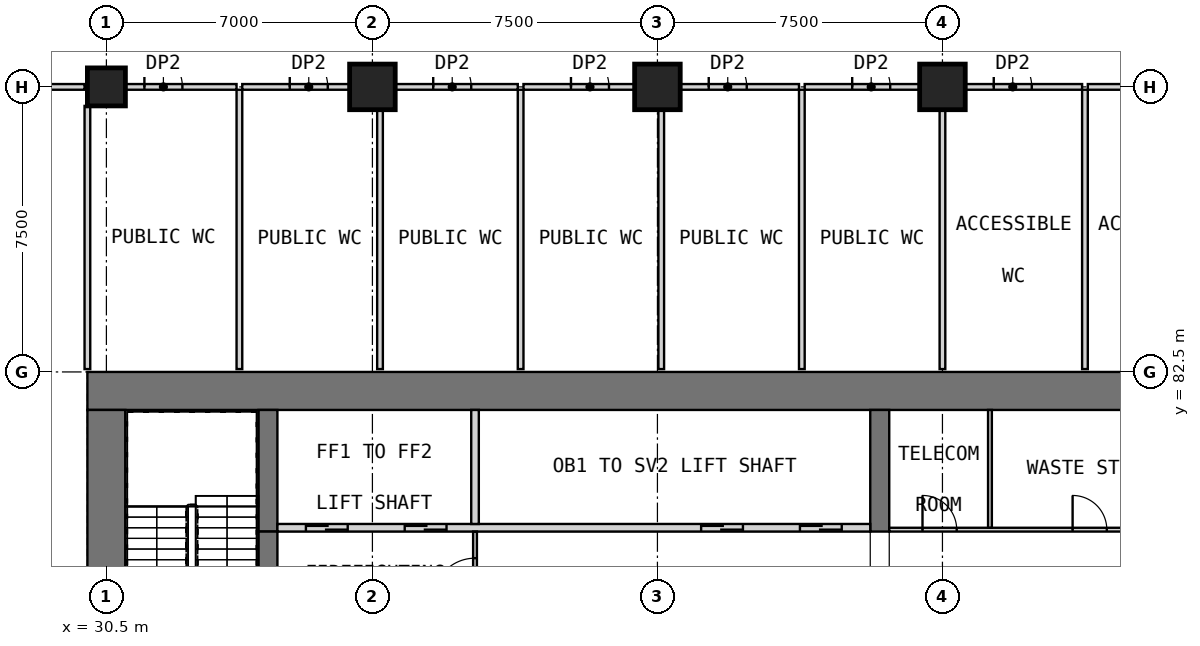
"""IFC4 building model, lengths in metres.
Left out: names, types, materials, properties, quantities, classifications, styles, units other than length and angle.
Written with IfcOpenShell. Run it as: python <this file> out.ifc"""

import sys

from ifc_helpers import new_model, si_unit, direction, frame, frame_2d, origin, origin_2d, place, context, subcontext, project, spatial, rectangle, extrude, element, fill, save


model = new_model("IFC4")
c1 = context("Model", 3, precision=1e-05, world=origin(), true_north=direction((0.0, 1.0)))
c2 = subcontext(c1, "Body", "Model", "MODEL_VIEW")
j1 = project(units=[si_unit("LENGTHUNIT", "METRE"), si_unit("PLANEANGLEUNIT", "RADIAN")], contexts=[c1])
p1 = place(None, origin())
s1 = spatial("IfcSite", under=j1, at=p1, CompositionType="ELEMENT")
p2 = place(p1, origin())
s2 = spatial("IfcBuilding", under=s1, at=p2, CompositionType="ELEMENT")
p3 = place(p2, frame((0.0, 0.0, 29.0)))
s3 = spatial("IfcBuildingStorey", under=s2, at=p3, CompositionType="ELEMENT", Elevation=29.0)
p4 = place(p3, frame((30.5, 90.0, 0.0), z_axis=(0.0, 0.0, 1.0), x_axis=(1.0, 0.0, 0.0)))
e1 = element("IfcColumn", 1, at=p4, inside=s3, PredefinedType="COLUMN", context=c2, shape_type="SweptSolid", body=[
    extrude(rectangle(XDim=1.0, YDim=1.0, at=origin_2d()), origin(), (0.0, 0.0, 1.0), 5.0),
])
for number, where, z_axis, x_axis in (
    (2, (37.5, 90.0, 0.0), (0.0, 0.0, 1.0), (1.0, 0.0, 0.0)),
    (3, (45.0, 90.0, 0.0), (0.0, 0.0, 1.0), (1.0, 0.0, 0.0)),
    (4, (52.5, 90.0, 0.0), (0.0, 0.0, 1.0), (1.0, 0.0, 0.0)),
):
    element("IfcColumn", number, at=place(p3, frame(where, z_axis=z_axis, x_axis=x_axis)), inside=s3, PredefinedType="COLUMN", context=c2, shape_type="SweptSolid", body=[
        extrude(rectangle(XDim=1.2, YDim=1.2, at=origin_2d()), origin(), (0.0, 0.0, 1.0), 5.0),
    ])
p5 = place(p3, frame((30.0, 82.0, 0.0), z_axis=(0.0, 0.0, 1.0), x_axis=(1.0, 0.0, 0.0)))
e5 = element("IfcWall", 5, at=p5, inside=s3, PredefinedType="SHEAR", context=c2, shape_type="SweptSolid", body=[
    extrude(rectangle(XDim=30.0, YDim=1.0, at=frame_2d((15.0, 0.0))), origin(), (0.0, 0.0, 1.0), 5.0),
])
p6 = place(p3, frame((30.5, 61.0, 0.0), z_axis=(0.0, 0.0, 1.0), x_axis=(0.0, 1.0, 0.0)))
e6 = element("IfcWall", 6, at=p6, inside=s3, PredefinedType="SHEAR", context=c2, shape_type="SweptSolid", body=[
    extrude(rectangle(XDim=20.5, YDim=1.0, at=frame_2d((10.25, 0.0))), origin(), (0.0, 0.0, 1.0), 5.0),
])
for number, where, z_axis, x_axis in (
    (7, (34.75, 78.3, 0.0), (0.0, 0.0, 1.0), (0.0, 1.0, 0.0)),
    (8, (50.85, 78.3, 0.0), (0.0, 0.0, 1.0), (0.0, 1.0, 0.0)),
):
    element("IfcWall", number, at=place(p3, frame(where, z_axis=z_axis, x_axis=x_axis)), inside=s3, PredefinedType="SHEAR", context=c2, shape_type="SweptSolid", body=[
        extrude(rectangle(XDim=3.2, YDim=0.5, at=frame_2d((1.6, 0.0))), origin(), (0.0, 0.0, 1.0), 5.0),
    ])
p7 = place(p3, frame((35.0, 78.4, 0.0), z_axis=(0.0, 0.0, 1.0), x_axis=(1.0, 0.0, 0.0)))
e9 = element("IfcWall", 9, at=p7, inside=s3, PredefinedType="SOLIDWALL", context=c2, shape_type="SweptSolid", body=[
    extrude(rectangle(XDim=15.6, YDim=0.2, at=frame_2d((7.8, 0.0))), origin(), (0.0, 0.0, 1.0), 5.0),
])
p8 = place(p7, frame((0.75, 0.0, 0.0)))
e10 = element("IfcOpeningElement", 10, at=p8, cuts=e9, PredefinedType="OPENING", context=c2, shape_type="SweptSolid", body=[
    extrude(rectangle(XDim=1.1, YDim=2.1, at=frame_2d((0.55, 1.05))), frame((0.0, 0.11, 0.0), z_axis=(0.0, -1.0, 0.0), x_axis=(1.0, 0.0, 0.0)), (0.0, 0.0, 1.0), 0.22),
])
p9 = place(p7, frame((3.35, 0.0, 0.0)))
e11 = element("IfcOpeningElement", 11, at=p9, cuts=e9, PredefinedType="OPENING", context=c2, shape_type="SweptSolid", body=[
    extrude(rectangle(XDim=1.1, YDim=2.1, at=frame_2d((0.55, 1.05))), frame((0.0, 0.11, 0.0), z_axis=(0.0, -1.0, 0.0), x_axis=(1.0, 0.0, 0.0)), (0.0, 0.0, 1.0), 0.22),
])
p10 = place(p7, frame((11.15, 0.0, 0.0)))
e12 = element("IfcOpeningElement", 12, at=p10, cuts=e9, PredefinedType="OPENING", context=c2, shape_type="SweptSolid", body=[
    extrude(rectangle(XDim=1.1, YDim=2.1, at=frame_2d((0.55, 1.05))), frame((0.0, 0.11, 0.0), z_axis=(0.0, -1.0, 0.0), x_axis=(1.0, 0.0, 0.0)), (0.0, 0.0, 1.0), 0.22),
])
p11 = place(p7, frame((13.75, 0.0, 0.0)))
e13 = element("IfcOpeningElement", 13, at=p11, cuts=e9, PredefinedType="OPENING", context=c2, shape_type="SweptSolid", body=[
    extrude(rectangle(XDim=1.1, YDim=2.1, at=frame_2d((0.55, 1.05))), frame((0.0, 0.11, 0.0), z_axis=(0.0, -1.0, 0.0), x_axis=(1.0, 0.0, 0.0)), (0.0, 0.0, 1.0), 0.22),
])
p12 = place(p3, frame((40.2, 78.5, 0.0), z_axis=(0.0, 0.0, 1.0), x_axis=(0.0, 1.0, 0.0)))
e14 = element("IfcWall", 14, at=p12, inside=s3, PredefinedType="SOLIDWALL", context=c2, shape_type="SweptSolid", body=[
    extrude(rectangle(XDim=3.0, YDim=0.2, at=frame_2d((1.5, 0.0))), origin(), (0.0, 0.0, 1.0), 5.0),
])
p13 = place(p3, frame((40.2, 75.3, 0.0), z_axis=(0.0, 0.0, 1.0), x_axis=(0.0, 1.0, 0.0)))
e15 = element("IfcWall", 15, at=p13, inside=s3, PredefinedType="PARTITIONING", context=c2, shape_type="SweptSolid", body=[
    extrude(rectangle(XDim=3.0, YDim=0.1, at=frame_2d((1.5, 0.0))), origin(), (0.0, 0.0, 1.0), 4.75),
])
p14 = place(p13, frame((1.2, 0.0, 0.0)))
e16 = element("IfcOpeningElement", 16, at=p14, cuts=e15, PredefinedType="OPENING", context=c2, shape_type="SweptSolid", body=[
    extrude(rectangle(XDim=1.1, YDim=2.1, at=frame_2d((0.55, 1.05))), frame((0.0, 0.06, 0.0), z_axis=(0.0, -1.0, 0.0), x_axis=(1.0, 0.0, 0.0)), (0.0, 0.0, 1.0), 0.12),
])
p15 = place(p3, frame((34.75, 74.45, 0.0), z_axis=(0.0, 0.0, 1.0), x_axis=(0.0, 1.0, 0.0)))
e17 = element("IfcWall", 17, at=p15, inside=s3, PredefinedType="SOLIDWALL", context=c2, shape_type="SweptSolid", body=[
    extrude(rectangle(XDim=3.85, YDim=0.5, at=frame_2d((1.925, 0.0))), origin(), (0.0, 0.0, 1.0), 3.8),
])
p16 = place(p15, frame((1.0, 0.0, 0.0)))
e18 = element("IfcOpeningElement", 18, at=p16, cuts=e17, PredefinedType="OPENING", context=c2, shape_type="SweptSolid", body=[
    extrude(rectangle(XDim=1.2, YDim=2.1, at=frame_2d((0.6, 1.05))), frame((0.0, 0.26, 0.0), z_axis=(0.0, -1.0, 0.0), x_axis=(1.0, 0.0, 0.0)), (0.0, 0.0, 1.0), 0.52),
])
p17 = place(p3, frame((51.1, 78.35, 0.0), z_axis=(0.0, 0.0, 1.0), x_axis=(1.0, 0.0, 0.0)))
e19 = element("IfcWall", 19, at=p17, inside=s3, PredefinedType="PARTITIONING", context=c2, shape_type="SweptSolid", body=[
    extrude(rectangle(XDim=7.9, YDim=0.1, at=frame_2d((3.95, 0.0))), origin(), (0.0, 0.0, 1.0), 4.75),
])
p18 = place(p17, frame((0.875, 0.0, 0.0)))
e20 = element("IfcOpeningElement", 20, at=p18, cuts=e19, PredefinedType="OPENING", context=c2, shape_type="SweptSolid", body=[
    extrude(rectangle(XDim=0.9, YDim=2.1, at=frame_2d((0.45, 1.05))), frame((0.0, 0.06, 0.0), z_axis=(0.0, -1.0, 0.0), x_axis=(1.0, 0.0, 0.0)), (0.0, 0.0, 1.0), 0.12),
])
p19 = place(p17, frame((4.825, 0.0, 0.0)))
e21 = element("IfcOpeningElement", 21, at=p19, cuts=e19, PredefinedType="OPENING", context=c2, shape_type="SweptSolid", body=[
    extrude(rectangle(XDim=0.9, YDim=2.1, at=frame_2d((0.45, 1.05))), frame((0.0, 0.06, 0.0), z_axis=(0.0, -1.0, 0.0), x_axis=(1.0, 0.0, 0.0)), (0.0, 0.0, 1.0), 0.12),
])
p20 = place(p3, frame((53.75, 78.4, 0.0), z_axis=(0.0, 0.0, 1.0), x_axis=(0.0, 1.0, 0.0)))
e22 = element("IfcWall", 22, at=p20, inside=s3, PredefinedType="PARTITIONING", context=c2, shape_type="SweptSolid", body=[
    extrude(rectangle(XDim=3.1, YDim=0.1, at=frame_2d((1.55, 0.0))), origin(), (0.0, 0.0, 1.0), 4.75),
])
p21 = place(p3, frame((23.6, 90.0, 0.0), z_axis=(0.0, 0.0, 1.0), x_axis=(1.0, 0.0, 0.0)))
e23 = element("IfcWall", 23, at=p21, inside=s3, PredefinedType="PARTITIONING", context=c2, shape_type="SweptSolid", body=[
    extrude(rectangle(XDim=6.325, YDim=0.15, at=frame_2d((3.163, 0.0))), origin(), (0.0, 0.0, 1.0), 4.7),
])
p22 = place(p3, frame((31.0, 90.0, 0.0), z_axis=(0.0, 0.0, 1.0), x_axis=(1.0, 0.0, 0.0)))
e24 = element("IfcWall", 24, at=p22, inside=s3, PredefinedType="PARTITIONING", context=c2, shape_type="SweptSolid", body=[
    extrude(rectangle(XDim=2.925, YDim=0.15, at=frame_2d((1.462, 0.0))), origin(), (0.0, 0.0, 1.0), 4.7),
])
p23 = place(p22, frame((0.5, 0.0, 0.0)))
e25 = element("IfcOpeningElement", 25, at=p23, cuts=e24, PredefinedType="OPENING", context=c2, shape_type="SweptSolid", body=[
    extrude(rectangle(XDim=1.0, YDim=2.1, at=frame_2d((0.5, 1.05))), frame((0.0, 0.085, 0.0), z_axis=(0.0, -1.0, 0.0), x_axis=(1.0, 0.0, 0.0)), (0.0, 0.0, 1.0), 0.17),
])
p24 = place(p3, frame((34.075, 90.0, 0.0), z_axis=(0.0, 0.0, 1.0), x_axis=(1.0, 0.0, 0.0)))
e26 = element("IfcWall", 26, at=p24, inside=s3, PredefinedType="PARTITIONING", context=c2, shape_type="SweptSolid", body=[
    extrude(rectangle(XDim=2.825, YDim=0.15, at=frame_2d((1.413, 0.0))), origin(), (0.0, 0.0, 1.0), 4.7),
])
p25 = place(p24, frame((1.25, 0.0, 0.0)))
e27 = element("IfcOpeningElement", 27, at=p25, cuts=e26, PredefinedType="OPENING", context=c2, shape_type="SweptSolid", body=[
    extrude(rectangle(XDim=1.0, YDim=2.1, at=frame_2d((0.5, 1.05))), frame((0.0, 0.085, 0.0), z_axis=(0.0, -1.0, 0.0), x_axis=(1.0, 0.0, 0.0)), (0.0, 0.0, 1.0), 0.17),
])
p26 = place(p3, frame((38.1, 90.0, 0.0), z_axis=(0.0, 0.0, 1.0), x_axis=(1.0, 0.0, 0.0)))
e28 = element("IfcWall", 28, at=p26, inside=s3, PredefinedType="PARTITIONING", context=c2, shape_type="SweptSolid", body=[
    extrude(rectangle(XDim=3.225, YDim=0.15, at=frame_2d((1.612, 0.0))), origin(), (0.0, 0.0, 1.0), 4.7),
])
p27 = place(p26, frame((1.0, 0.0, 0.0)))
e29 = element("IfcOpeningElement", 29, at=p27, cuts=e28, PredefinedType="OPENING", context=c2, shape_type="SweptSolid", body=[
    extrude(rectangle(XDim=1.0, YDim=2.1, at=frame_2d((0.5, 1.05))), frame((0.0, 0.085, 0.0), z_axis=(0.0, -1.0, 0.0), x_axis=(1.0, 0.0, 0.0)), (0.0, 0.0, 1.0), 0.17),
])
p28 = place(p3, frame((41.475, 90.0, 0.0), z_axis=(0.0, 0.0, 1.0), x_axis=(1.0, 0.0, 0.0)))
e30 = element("IfcWall", 30, at=p28, inside=s3, PredefinedType="PARTITIONING", context=c2, shape_type="SweptSolid", body=[
    extrude(rectangle(XDim=2.925, YDim=0.15, at=frame_2d((1.462, 0.0))), origin(), (0.0, 0.0, 1.0), 4.7),
])
p29 = place(p28, frame((1.25, 0.0, 0.0)))
e31 = element("IfcOpeningElement", 31, at=p29, cuts=e30, PredefinedType="OPENING", context=c2, shape_type="SweptSolid", body=[
    extrude(rectangle(XDim=1.0, YDim=2.1, at=frame_2d((0.5, 1.05))), frame((0.0, 0.085, 0.0), z_axis=(0.0, -1.0, 0.0), x_axis=(1.0, 0.0, 0.0)), (0.0, 0.0, 1.0), 0.17),
])
p30 = place(p3, frame((45.6, 90.0, 0.0), z_axis=(0.0, 0.0, 1.0), x_axis=(1.0, 0.0, 0.0)))
e32 = element("IfcWall", 32, at=p30, inside=s3, PredefinedType="PARTITIONING", context=c2, shape_type="SweptSolid", body=[
    extrude(rectangle(XDim=3.125, YDim=0.15, at=frame_2d((1.562, 0.0))), origin(), (0.0, 0.0, 1.0), 4.7),
])
p31 = place(p30, frame((0.75, 0.0, 0.0)))
e33 = element("IfcOpeningElement", 33, at=p31, cuts=e32, PredefinedType="OPENING", context=c2, shape_type="SweptSolid", body=[
    extrude(rectangle(XDim=1.0, YDim=2.1, at=frame_2d((0.5, 1.05))), frame((0.0, 0.085, 0.0), z_axis=(0.0, -1.0, 0.0), x_axis=(1.0, 0.0, 0.0)), (0.0, 0.0, 1.0), 0.17),
])
p32 = place(p3, frame((48.875, 90.0, 0.0), z_axis=(0.0, 0.0, 1.0), x_axis=(1.0, 0.0, 0.0)))
e34 = element("IfcWall", 34, at=p32, inside=s3, PredefinedType="PARTITIONING", context=c2, shape_type="SweptSolid", body=[
    extrude(rectangle(XDim=3.025, YDim=0.15, at=frame_2d((1.512, 0.0))), origin(), (0.0, 0.0, 1.0), 4.7),
])
p33 = place(p32, frame((1.25, 0.0, 0.0)))
e35 = element("IfcOpeningElement", 35, at=p33, cuts=e34, PredefinedType="OPENING", context=c2, shape_type="SweptSolid", body=[
    extrude(rectangle(XDim=1.0, YDim=2.1, at=frame_2d((0.5, 1.05))), frame((0.0, 0.085, 0.0), z_axis=(0.0, -1.0, 0.0), x_axis=(1.0, 0.0, 0.0)), (0.0, 0.0, 1.0), 0.17),
])
p34 = place(p3, frame((53.1, 90.0, 0.0), z_axis=(0.0, 0.0, 1.0), x_axis=(1.0, 0.0, 0.0)))
e36 = element("IfcWall", 36, at=p34, inside=s3, PredefinedType="PARTITIONING", context=c2, shape_type="SweptSolid", body=[
    extrude(rectangle(XDim=3.075, YDim=0.15, at=frame_2d((1.538, 0.0))), origin(), (0.0, 0.0, 1.0), 4.7),
])
p35 = place(p34, frame((0.75, 0.0, 0.0)))
e37 = element("IfcOpeningElement", 37, at=p35, cuts=e36, PredefinedType="OPENING", context=c2, shape_type="SweptSolid", body=[
    extrude(rectangle(XDim=1.0, YDim=2.1, at=frame_2d((0.5, 1.05))), frame((0.0, 0.085, 0.0), z_axis=(0.0, -1.0, 0.0), x_axis=(1.0, 0.0, 0.0)), (0.0, 0.0, 1.0), 0.17),
])
p36 = place(p3, frame((56.325, 90.0, 0.0), z_axis=(0.0, 0.0, 1.0), x_axis=(1.0, 0.0, 0.0)))
e38 = element("IfcWall", 38, at=p36, inside=s3, PredefinedType="PARTITIONING", context=c2, shape_type="SweptSolid", body=[
    extrude(rectangle(XDim=3.075, YDim=0.15, at=frame_2d((1.538, 0.0))), origin(), (0.0, 0.0, 1.0), 4.7),
])
p37 = place(p36, frame((1.25, 0.0, 0.0)))
e39 = element("IfcOpeningElement", 39, at=p37, cuts=e38, PredefinedType="OPENING", context=c2, shape_type="SweptSolid", body=[
    extrude(rectangle(XDim=1.0, YDim=2.1, at=frame_2d((0.5, 1.05))), frame((0.0, 0.085, 0.0), z_axis=(0.0, -1.0, 0.0), x_axis=(1.0, 0.0, 0.0)), (0.0, 0.0, 1.0), 0.17),
])
p38 = place(p3, frame((52.5, 82.575, 0.0), z_axis=(0.0, 0.0, 1.0), x_axis=(0.0, 1.0, 0.0)))
e40 = element("IfcWall", 40, at=p38, inside=s3, PredefinedType="PARTITIONING", context=c2, shape_type="SweptSolid", body=[
    extrude(rectangle(XDim=6.825, YDim=0.15, at=frame_2d((3.413, 0.0))), origin(), (0.0, 0.0, 1.0), 4.7),
])
p39 = place(p3, frame((56.25, 82.575, 0.0), z_axis=(0.0, 0.0, 1.0), x_axis=(0.0, 1.0, 0.0)))
e41 = element("IfcWall", 41, at=p39, inside=s3, PredefinedType="PARTITIONING", context=c2, shape_type="SweptSolid", body=[
    extrude(rectangle(XDim=7.35, YDim=0.15, at=frame_2d((3.675, 0.0))), origin(), (0.0, 0.0, 1.0), 4.7),
])
p40 = place(p3, frame((30.0, 82.575, 0.0), z_axis=(0.0, 0.0, 1.0), x_axis=(0.0, 1.0, 0.0)))
e42 = element("IfcWall", 42, at=p40, inside=s3, PredefinedType="PARTITIONING", context=c2, shape_type="SweptSolid", body=[
    extrude(rectangle(XDim=6.925, YDim=0.15, at=frame_2d((3.462, 0.0))), origin(), (0.0, 0.0, 1.0), 4.7),
])
p41 = place(p3, frame((34.0, 82.575, 0.0), z_axis=(0.0, 0.0, 1.0), x_axis=(0.0, 1.0, 0.0)))
e43 = element("IfcWall", 43, at=p41, inside=s3, PredefinedType="PARTITIONING", context=c2, shape_type="SweptSolid", body=[
    extrude(rectangle(XDim=7.35, YDim=0.15, at=frame_2d((3.675, 0.0))), origin(), (0.0, 0.0, 1.0), 4.7),
])
p42 = place(p3, frame((37.7, 82.575, 0.0), z_axis=(0.0, 0.0, 1.0), x_axis=(0.0, 1.0, 0.0)))
e44 = element("IfcWall", 44, at=p42, inside=s3, PredefinedType="PARTITIONING", context=c2, shape_type="SweptSolid", body=[
    extrude(rectangle(XDim=6.825, YDim=0.15, at=frame_2d((3.413, 0.0))), origin(), (0.0, 0.0, 1.0), 4.7),
])
p43 = place(p3, frame((41.4, 82.575, 0.0), z_axis=(0.0, 0.0, 1.0), x_axis=(0.0, 1.0, 0.0)))
e45 = element("IfcWall", 45, at=p43, inside=s3, PredefinedType="PARTITIONING", context=c2, shape_type="SweptSolid", body=[
    extrude(rectangle(XDim=7.35, YDim=0.15, at=frame_2d((3.675, 0.0))), origin(), (0.0, 0.0, 1.0), 4.7),
])
p44 = place(p3, frame((45.1, 82.575, 0.0), z_axis=(0.0, 0.0, 1.0), x_axis=(0.0, 1.0, 0.0)))
e46 = element("IfcWall", 46, at=p44, inside=s3, PredefinedType="PARTITIONING", context=c2, shape_type="SweptSolid", body=[
    extrude(rectangle(XDim=6.825, YDim=0.15, at=frame_2d((3.413, 0.0))), origin(), (0.0, 0.0, 1.0), 4.7),
])
p45 = place(p3, frame((48.8, 82.575, 0.0), z_axis=(0.0, 0.0, 1.0), x_axis=(0.0, 1.0, 0.0)))
e47 = element("IfcWall", 47, at=p45, inside=s3, PredefinedType="PARTITIONING", context=c2, shape_type="SweptSolid", body=[
    extrude(rectangle(XDim=7.35, YDim=0.15, at=frame_2d((3.675, 0.0))), origin(), (0.0, 0.0, 1.0), 4.7),
])
p46 = place(p8, origin())
e48 = element("IfcDoor", 48, at=p46, inside=s3, OperationType="DOUBLE_DOOR_SLIDING", PredefinedType="DOOR", context=c2, shape_type="SweptSolid", body=[
    extrude(rectangle(XDim=1.1, YDim=2.1, at=frame_2d((0.55, 1.05))), frame((0.0, 0.025, 0.0), z_axis=(0.0, -1.0, 0.0), x_axis=(1.0, 0.0, 0.0)), (0.0, 0.0, 1.0), 0.05),
])
fill(e10, e48)
p47 = place(p9, origin())
e49 = element("IfcDoor", 49, at=p47, inside=s3, OperationType="DOUBLE_DOOR_SLIDING", PredefinedType="DOOR", context=c2, shape_type="SweptSolid", body=[
    extrude(rectangle(XDim=1.1, YDim=2.1, at=frame_2d((0.55, 1.05))), frame((0.0, 0.025, 0.0), z_axis=(0.0, -1.0, 0.0), x_axis=(1.0, 0.0, 0.0)), (0.0, 0.0, 1.0), 0.05),
])
fill(e11, e49)
p48 = place(p10, origin())
e50 = element("IfcDoor", 50, at=p48, inside=s3, OperationType="DOUBLE_DOOR_SLIDING", PredefinedType="DOOR", context=c2, shape_type="SweptSolid", body=[
    extrude(rectangle(XDim=1.1, YDim=2.1, at=frame_2d((0.55, 1.05))), frame((0.0, 0.025, 0.0), z_axis=(0.0, -1.0, 0.0), x_axis=(1.0, 0.0, 0.0)), (0.0, 0.0, 1.0), 0.05),
])
fill(e12, e50)
p49 = place(p11, origin())
e51 = element("IfcDoor", 51, at=p49, inside=s3, OperationType="DOUBLE_DOOR_SLIDING", PredefinedType="DOOR", context=c2, shape_type="SweptSolid", body=[
    extrude(rectangle(XDim=1.1, YDim=2.1, at=frame_2d((0.55, 1.05))), frame((0.0, 0.025, 0.0), z_axis=(0.0, -1.0, 0.0), x_axis=(1.0, 0.0, 0.0)), (0.0, 0.0, 1.0), 0.05),
])
fill(e13, e51)
p50 = place(p14, origin())
e52 = element("IfcDoor", 52, at=p50, inside=s3, OperationType="SINGLE_SWING_LEFT", PredefinedType="DOOR", context=c2, shape_type="SweptSolid", body=[
    extrude(rectangle(XDim=1.1, YDim=2.1, at=frame_2d((0.55, 1.05))), frame((0.0, 0.025, 0.0), z_axis=(0.0, -1.0, 0.0), x_axis=(1.0, 0.0, 0.0)), (0.0, 0.0, 1.0), 0.05),
])
fill(e16, e52)
p51 = place(p18, origin())
e53 = element("IfcDoor", 53, at=p51, inside=s3, OperationType="SINGLE_SWING_LEFT", PredefinedType="DOOR", context=c2, shape_type="SweptSolid", body=[
    extrude(rectangle(XDim=0.9, YDim=2.1, at=frame_2d((0.45, 1.05))), frame((0.0, 0.025, 0.0), z_axis=(0.0, -1.0, 0.0), x_axis=(1.0, 0.0, 0.0)), (0.0, 0.0, 1.0), 0.05),
])
fill(e20, e53)
p52 = place(p19, origin())
e54 = element("IfcDoor", 54, at=p52, inside=s3, OperationType="SINGLE_SWING_RIGHT", PredefinedType="DOOR", context=c2, shape_type="SweptSolid", body=[
    extrude(rectangle(XDim=0.9, YDim=2.1, at=frame_2d((0.45, 1.05))), frame((0.0, 0.025, 0.0), z_axis=(0.0, -1.0, 0.0), x_axis=(1.0, 0.0, 0.0)), (0.0, 0.0, 1.0), 0.05),
])
fill(e21, e54)
p53 = place(p23, origin())
e55 = element("IfcDoor", 55, at=p53, inside=s3, OperationType="SINGLE_SWING_LEFT", PredefinedType="DOOR", context=c2, shape_type="SweptSolid", body=[
    extrude(rectangle(XDim=1.0, YDim=2.1, at=frame_2d((0.5, 1.05))), frame((0.0, 0.025, 0.0), z_axis=(0.0, -1.0, 0.0), x_axis=(1.0, 0.0, 0.0)), (0.0, 0.0, 1.0), 0.05),
])
fill(e25, e55)
p54 = place(p25, origin())
e56 = element("IfcDoor", 56, at=p54, inside=s3, OperationType="SINGLE_SWING_LEFT", PredefinedType="DOOR", context=c2, shape_type="SweptSolid", body=[
    extrude(rectangle(XDim=1.0, YDim=2.1, at=frame_2d((0.5, 1.05))), frame((0.0, 0.025, 0.0), z_axis=(0.0, -1.0, 0.0), x_axis=(1.0, 0.0, 0.0)), (0.0, 0.0, 1.0), 0.05),
])
fill(e27, e56)
p55 = place(p27, origin())
e57 = element("IfcDoor", 57, at=p55, inside=s3, OperationType="SINGLE_SWING_LEFT", PredefinedType="DOOR", context=c2, shape_type="SweptSolid", body=[
    extrude(rectangle(XDim=1.0, YDim=2.1, at=frame_2d((0.5, 1.05))), frame((0.0, 0.025, 0.0), z_axis=(0.0, -1.0, 0.0), x_axis=(1.0, 0.0, 0.0)), (0.0, 0.0, 1.0), 0.05),
])
fill(e29, e57)
p56 = place(p29, origin())
e58 = element("IfcDoor", 58, at=p56, inside=s3, OperationType="SINGLE_SWING_LEFT", PredefinedType="DOOR", context=c2, shape_type="SweptSolid", body=[
    extrude(rectangle(XDim=1.0, YDim=2.1, at=frame_2d((0.5, 1.05))), frame((0.0, 0.025, 0.0), z_axis=(0.0, -1.0, 0.0), x_axis=(1.0, 0.0, 0.0)), (0.0, 0.0, 1.0), 0.05),
])
fill(e31, e58)
p57 = place(p31, origin())
e59 = element("IfcDoor", 59, at=p57, inside=s3, OperationType="SINGLE_SWING_LEFT", PredefinedType="DOOR", context=c2, shape_type="SweptSolid", body=[
    extrude(rectangle(XDim=1.0, YDim=2.1, at=frame_2d((0.5, 1.05))), frame((0.0, 0.025, 0.0), z_axis=(0.0, -1.0, 0.0), x_axis=(1.0, 0.0, 0.0)), (0.0, 0.0, 1.0), 0.05),
])
fill(e33, e59)
p58 = place(p33, origin())
e60 = element("IfcDoor", 60, at=p58, inside=s3, OperationType="SINGLE_SWING_LEFT", PredefinedType="DOOR", context=c2, shape_type="SweptSolid", body=[
    extrude(rectangle(XDim=1.0, YDim=2.1, at=frame_2d((0.5, 1.05))), frame((0.0, 0.025, 0.0), z_axis=(0.0, -1.0, 0.0), x_axis=(1.0, 0.0, 0.0)), (0.0, 0.0, 1.0), 0.05),
])
fill(e35, e60)
p59 = place(p35, origin())
e61 = element("IfcDoor", 61, at=p59, inside=s3, OperationType="SINGLE_SWING_LEFT", PredefinedType="DOOR", context=c2, shape_type="SweptSolid", body=[
    extrude(rectangle(XDim=1.0, YDim=2.1, at=frame_2d((0.5, 1.05))), frame((0.0, 0.025, 0.0), z_axis=(0.0, -1.0, 0.0), x_axis=(1.0, 0.0, 0.0)), (0.0, 0.0, 1.0), 0.05),
])
fill(e37, e61)
save(model, sys.argv[1])
